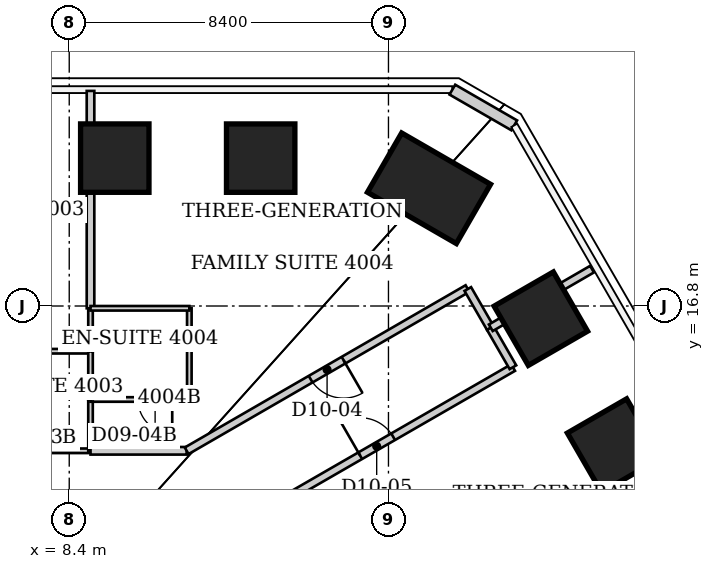
"""IFC4 building model, lengths in metres.
Left out: names, types, materials, properties, quantities, classifications, styles, units other than length and angle.
Written with IfcOpenShell. Run it as: python <this file> out.ifc"""

import sys

from ifc_helpers import new_model, si_unit, direction, frame, frame_2d, origin, origin_2d, place, context, subcontext, project, spatial, rectangle, extrude, element, fill, save


model = new_model("IFC4")
c1 = context("Model", 3, precision=1e-05, world=origin(), true_north=direction((0.0, 1.0)))
c2 = subcontext(c1, "Body", "Model", "MODEL_VIEW")
j1 = project(units=[si_unit("LENGTHUNIT", "METRE"), si_unit("PLANEANGLEUNIT", "RADIAN")], contexts=[c1])
p1 = place(None, origin())
s1 = spatial("IfcSite", under=j1, at=p1, CompositionType="ELEMENT")
p2 = place(p1, origin())
s2 = spatial("IfcBuilding", under=s1, at=p2, CompositionType="ELEMENT")
p3 = place(p2, frame((0.0, 0.0, 161.4)))
s3 = spatial("IfcBuildingStorey", under=s2, at=p3, CompositionType="ELEMENT", Elevation=161.4)
p4 = place(p3, frame((9.598, 20.692, 0.0), z_axis=(-0.021878437619, -0.047221495857, 0.998644813883), x_axis=(-0.001498284872, 0.998884335352, 0.047199997152)))
e1 = element("IfcColumn", 1, at=p4, inside=s3, PredefinedType="COLUMN", context=c2, shape_type="SweptSolid", body=[
    extrude(rectangle(XDim=1.8, YDim=1.8, at=origin_2d()), origin(), (0.0, 0.0, 1.0), 3.805),
])
p5 = place(p3, frame((13.438, 20.691, 0.0), z_axis=(-0.030661228378, -0.047210594322, 0.998414267155), x_axis=(-0.001430243146, 0.998884958054, 0.047188928551)))
e2 = element("IfcColumn", 2, at=p5, inside=s3, PredefinedType="COLUMN", context=c2, shape_type="SweptSolid", body=[
    extrude(rectangle(XDim=1.8, YDim=1.8, at=origin_2d()), origin(), (0.0, 0.0, 1.0), 3.806),
])
p6 = place(p3, frame((17.867, 19.898, 0.0), z_axis=(-0.041104111089, -0.045785234505, 0.998105287208), x_axis=(0.498342902409, 0.864887659108, 0.060197082496)))
e3 = element("IfcColumn", 3, at=p6, inside=s3, PredefinedType="COLUMN", context=c2, shape_type="SweptSolid", body=[
    extrude(rectangle(XDim=1.8, YDim=2.7, at=origin_2d()), origin(), (0.0, 0.0, 1.0), 3.807),
])
p7 = place(p3, frame((20.809, 16.467, 0.0), z_axis=(-0.046752521918, -0.037004396634, 0.998220855484), x_axis=(0.864714175605, 0.498788120692, 0.058989873412)))
e4 = element("IfcColumn", 4, at=p7, inside=s3, PredefinedType="COLUMN", context=c2, shape_type="SweptSolid", body=[
    extrude(rectangle(XDim=1.8, YDim=1.8, at=origin_2d()), origin(), (0.0, 0.0, 1.0), 3.807),
])
p8 = place(p3, frame((22.738, 13.128, 0.0), z_axis=(-0.051115371342, -0.029501970913, 0.998256907076), x_axis=(0.864585430267, 0.499007902036, 0.059018196136)))
e5 = element("IfcColumn", 5, at=p8, inside=s3, PredefinedType="COLUMN", context=c2, shape_type="SweptSolid", body=[
    extrude(rectangle(XDim=1.8, YDim=1.8, at=origin_2d()), origin(), (0.0, 0.0, 1.0), 3.807),
])
p9 = place(p3, frame((18.481, 22.494, 0.0), z_axis=(0.0, 0.0, 1.0), x_axis=(0.865988793993, -0.500063404658, 0.0)))
e6 = element("IfcWall", 6, at=p9, inside=s3, PredefinedType="SOLIDWALL", context=c2, shape_type="SweptSolid", body=[
    extrude(rectangle(XDim=1.88, YDim=0.3, at=frame_2d((0.94, 0.0))), origin(), (0.0, 0.0, 1.0), 3.64),
])
p10 = place(p3, frame((8.96, 12.99, 0.0), z_axis=(0.0, 0.0, 1.0), x_axis=(-1.0, 0.0, 0.0)))
e7 = element("IfcWall", 7, at=p10, inside=s3, PredefinedType="PARTITIONING", context=c2, shape_type="SweptSolid", body=[
    extrude(rectangle(XDim=2.4, YDim=0.12, at=frame_2d((1.2, 0.0))), origin(), (0.0, 0.0, 1.0), 3.64),
])
p11 = place(p3, frame((8.96, 14.34, 0.0), z_axis=(0.0, 0.0, 1.0), x_axis=(0.0, -1.0, 0.0)))
e8 = element("IfcWall", 8, at=p11, inside=s3, PredefinedType="PARTITIONING", context=c2, shape_type="SweptSolid", body=[
    extrude(rectangle(XDim=1.35, YDim=0.12, at=frame_2d((0.675, 0.0))), origin(), (0.0, 0.0, 1.0), 3.64),
])
p12 = place(p3, frame((8.96, 14.34, 0.0), z_axis=(0.0, 0.0, 1.0), x_axis=(1.0, 0.0, 0.0)))
e9 = element("IfcWall", 9, at=p12, inside=s3, PredefinedType="PARTITIONING", context=c2, shape_type="SweptSolid", body=[
    extrude(rectangle(XDim=2.6, YDim=0.12, at=frame_2d((1.3, 0.0))), origin(), (0.0, 0.0, 1.0), 3.64),
])
p13 = place(p12, frame((1.25, 0.0, 0.0)))
e10 = element("IfcOpeningElement", 10, at=p13, cuts=e9, PredefinedType="OPENING", context=c2, shape_type="SweptSolid", body=[
    extrude(rectangle(XDim=0.9, YDim=2.03, at=frame_2d((0.45, 1.015))), frame((0.0, 0.06, 0.0), z_axis=(0.0, -1.0, 0.0), x_axis=(1.0, 0.0, 0.0)), (0.0, 0.0, 1.0), 0.12),
])
p14 = place(p3, frame((8.96, 15.61, 0.0), z_axis=(0.0, 0.0, 1.0), x_axis=(-1.0, 0.0, 0.0)))
e11 = element("IfcWall", 11, at=p14, inside=s3, PredefinedType="PARTITIONING", context=c2, shape_type="SweptSolid", body=[
    extrude(rectangle(XDim=2.4, YDim=0.12, at=frame_2d((1.2, 0.0))), origin(), (0.0, 0.0, 1.0), 3.64),
])
p15 = place(p3, frame((8.96, 15.61, 0.0), z_axis=(0.0, 0.0, 1.0), x_axis=(0.0, -1.0, 0.0)))
e12 = element("IfcWall", 12, at=p15, inside=s3, PredefinedType="PARTITIONING", context=c2, shape_type="SweptSolid", body=[
    extrude(rectangle(XDim=1.27, YDim=0.12, at=frame_2d((0.635, 0.0))), origin(), (0.0, 0.0, 1.0), 3.64),
])
p16 = place(p3, frame((8.96, 16.74, 0.0), z_axis=(0.0, 0.0, 1.0), x_axis=(0.0, -1.0, 0.0)))
e13 = element("IfcWall", 13, at=p16, inside=s3, PredefinedType="PARTITIONING", context=c2, shape_type="SweptSolid", body=[
    extrude(rectangle(XDim=1.13, YDim=0.12, at=frame_2d((0.565, 0.0))), origin(), (0.0, 0.0, 1.0), 3.64),
])
p17 = place(p3, frame((8.96, 22.46, 0.0), z_axis=(0.0, 0.0, 1.0), x_axis=(0.0, -1.0, 0.0)))
e14 = element("IfcWall", 14, at=p17, inside=s3, PredefinedType="PARTITIONING", context=c2, shape_type="SweptSolid", body=[
    extrude(rectangle(XDim=5.72, YDim=0.2, at=frame_2d((2.86, 0.0))), origin(), (0.0, 0.0, 1.0), 3.64),
])
p18 = place(p3, frame((11.49, 12.99, 0.0), z_axis=(0.0, 0.0, 1.0), x_axis=(-1.0, 0.0, 0.0)))
e15 = element("IfcWall", 15, at=p18, inside=s3, PredefinedType="PARTITIONING", context=c2, shape_type="SweptSolid", body=[
    extrude(rectangle(XDim=2.53, YDim=0.2, at=frame_2d((1.265, 0.0))), origin(), (0.0, 0.0, 1.0), 3.64),
])
p19 = place(p3, frame((11.56, 14.34, 0.0), z_axis=(0.0, 0.0, 1.0), x_axis=(0.0, 1.0, 0.0)))
e16 = element("IfcWall", 16, at=p19, inside=s3, PredefinedType="PARTITIONING", context=c2, shape_type="SweptSolid", body=[
    extrude(rectangle(XDim=2.4, YDim=0.12, at=frame_2d((1.2, 0.0))), origin(), (0.0, 0.0, 1.0), 3.64),
])
p20 = place(p3, frame((11.56, 16.74, 0.0), z_axis=(0.0, 0.0, 1.0), x_axis=(-1.0, 0.0, 0.0)))
e17 = element("IfcWall", 17, at=p20, inside=s3, PredefinedType="PARTITIONING", context=c2, shape_type="SweptSolid", body=[
    extrude(rectangle(XDim=2.6, YDim=0.12, at=frame_2d((1.3, 0.0))), origin(), (0.0, 0.0, 1.0), 3.64),
])
p21 = place(p3, frame((12.9, 11.04, 0.0), z_axis=(0.0, 0.0, 1.0), x_axis=(0.86631698263, 0.499494630209, 0.0)))
e18 = element("IfcWall", 18, at=p21, inside=s3, PredefinedType="PARTITIONING", context=c2, shape_type="SweptSolid", body=[
    extrude(rectangle(XDim=8.288, YDim=0.2, at=frame_2d((4.144, 0.0))), origin(), (0.0, 0.0, 1.0), 3.64),
])
p22 = place(p21, frame((3.644, 0.0, 0.0)))
e19 = element("IfcOpeningElement", 19, at=p22, cuts=e18, PredefinedType="OPENING", context=c2, shape_type="SweptSolid", body=[
    extrude(rectangle(XDim=1.0, YDim=2.13, at=frame_2d((0.5, 1.065))), frame((0.0, 0.1, 0.0), z_axis=(0.0, -1.0, 0.0), x_axis=(1.0, 0.0, 0.0)), (0.0, 0.0, 1.0), 0.2),
])
p23 = place(p3, frame((18.88, 17.26, 0.0), z_axis=(0.0, 0.0, 1.0), x_axis=(-0.865849652946, -0.500304285904, 0.0)))
e20 = element("IfcWall", 20, at=p23, inside=s3, PredefinedType="PARTITIONING", context=c2, shape_type="SweptSolid", body=[
    extrude(rectangle(XDim=8.535, YDim=0.2, at=frame_2d((4.268, 0.0))), origin(), (0.0, 0.0, 1.0), 3.64),
])
p24 = place(p23, frame((3.768, 0.0, 0.0)))
e21 = element("IfcOpeningElement", 21, at=p24, cuts=e20, PredefinedType="OPENING", context=c2, shape_type="SweptSolid", body=[
    extrude(rectangle(XDim=1.0, YDim=2.13, at=frame_2d((0.5, 1.065))), frame((0.0, 0.1, 0.0), z_axis=(0.0, -1.0, 0.0), x_axis=(1.0, 0.0, 0.0)), (0.0, 0.0, 1.0), 0.2),
])
p25 = place(p3, frame((18.887, 17.247, 0.0), z_axis=(0.0, 0.0, 1.0), x_axis=(0.499704629046, -0.866195869137, 0.0)))
e22 = element("IfcWall", 22, at=p25, inside=s3, PredefinedType="PARTITIONING", context=c2, shape_type="SweptSolid", body=[
    extrude(rectangle(XDim=1.186, YDim=0.2, at=frame_2d((0.593, 0.0))), origin(), (0.0, 0.0, 1.0), 3.64),
])
p26 = place(p3, frame((19.48, 16.22, 0.0), z_axis=(0.0, 0.0, 1.0), x_axis=(0.499734288277, -0.866178758179, 0.0)))
e23 = element("IfcWall", 23, at=p26, inside=s3, PredefinedType="PARTITIONING", context=c2, shape_type="SweptSolid", body=[
    extrude(rectangle(XDim=1.191, YDim=0.2, at=frame_2d((0.595, 0.0))), origin(), (0.0, 0.0, 1.0), 3.64),
])
p27 = place(p3, frame((22.156, 17.77, 0.0), z_axis=(0.0, 0.0, 1.0), x_axis=(-0.865382833183, -0.501111317006, 0.0)))
e24 = element("IfcWall", 24, at=p27, inside=s3, PredefinedType="PARTITIONING", context=c2, shape_type="SweptSolid", body=[
    extrude(rectangle(XDim=3.078, YDim=0.2, at=frame_2d((1.539, 0.0))), origin(), (0.0, 0.0, 1.0), 3.64),
])
p28 = place(p24, origin())
e25 = element("IfcDoor", 25, at=p28, inside=s3, OperationType="SINGLE_SWING_LEFT", PredefinedType="DOOR", context=c2, shape_type="SweptSolid", body=[
    extrude(rectangle(XDim=1.0, YDim=2.13, at=frame_2d((0.5, 1.065))), frame((0.0, 0.025, 0.0), z_axis=(0.0, -1.0, 0.0), x_axis=(1.0, 0.0, 0.0)), (0.0, 0.0, 1.0), 0.05),
])
fill(e21, e25)
p29 = place(p13, origin())
e26 = element("IfcDoor", 26, at=p29, inside=s3, OperationType="SINGLE_SWING_RIGHT", PredefinedType="DOOR", context=c2, shape_type="SweptSolid", body=[
    extrude(rectangle(XDim=0.9, YDim=2.03, at=frame_2d((0.45, 1.015))), frame((0.0, 0.025, 0.0), z_axis=(0.0, -1.0, 0.0), x_axis=(1.0, 0.0, 0.0)), (0.0, 0.0, 1.0), 0.05),
])
fill(e10, e26)
p30 = place(p22, origin())
e27 = element("IfcDoor", 27, at=p30, inside=s3, OperationType="SINGLE_SWING_LEFT", PredefinedType="DOOR", context=c2, shape_type="SweptSolid", body=[
    extrude(rectangle(XDim=1.0, YDim=2.13, at=frame_2d((0.5, 1.065))), frame((0.0, 0.025, 0.0), z_axis=(0.0, -1.0, 0.0), x_axis=(1.0, 0.0, 0.0)), (0.0, 0.0, 1.0), 0.05),
])
fill(e19, e27)
save(model, sys.argv[1])
